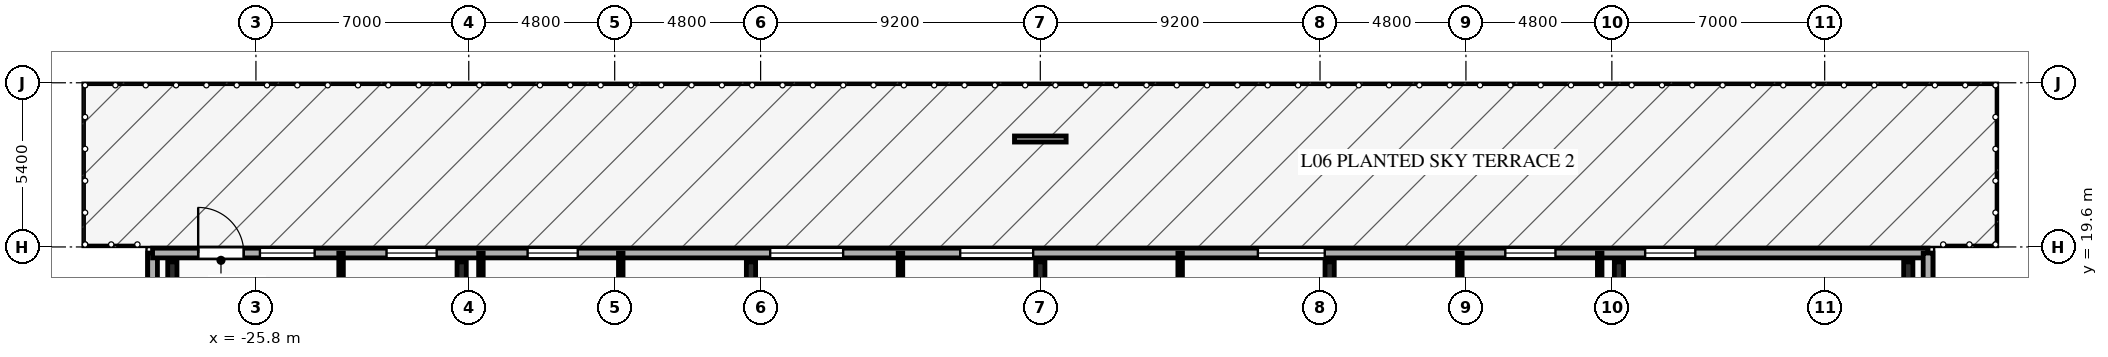
"""IFC4 building model, lengths in metres.
Left out: names, types, materials, properties, quantities, classifications, styles, units other than length and angle.
Written with IfcOpenShell. Run it as: python <this file> out.ifc"""

import sys

from ifc_helpers import new_model, si_unit, direction, frame, frame_2d, origin, origin_2d, place, context, subcontext, project, spatial, rectangle, i_section, extrude, element, fill, save


model = new_model("IFC4")
c1 = context("Model", 3, precision=1e-05, world=origin(), true_north=direction((0.0, 1.0)))
c2 = subcontext(c1, "Body", "Model", "MODEL_VIEW")
j1 = project(units=[si_unit("LENGTHUNIT", "METRE"), si_unit("PLANEANGLEUNIT", "RADIAN")], contexts=[c1])
p1 = place(None, origin())
s1 = spatial("IfcSite", under=j1, at=p1, CompositionType="ELEMENT")
p2 = place(p1, origin())
s2 = spatial("IfcBuilding", under=s1, at=p2, CompositionType="ELEMENT")
p3 = place(p2, frame((0.0, 0.0, 27.0)))
s3 = spatial("IfcBuildingStorey", under=s2, at=p3, CompositionType="ELEMENT", Elevation=27.0)
for number, where, z_axis, x_axis in (
    (1, (28.55, 18.75, 0.0), (0.0, 0.0, 1.0), (1.0, 0.0, 0.0)),
    (2, (19.033, 18.75, 0.0), (0.0, 0.0, 1.0), (1.0, 0.0, 0.0)),
    (3, (9.517, 18.75, 0.0), (0.0, 0.0, 1.0), (1.0, 0.0, 0.0)),
    (4, (0.0, 18.75, 0.0), (0.0, 0.0, 1.0), (1.0, 0.0, 0.0)),
    (5, (-9.517, 18.75, 0.0), (0.0, 0.0, 1.0), (1.0, 0.0, 0.0)),
    (6, (-19.033, 18.75, 0.0), (0.0, 0.0, 1.0), (1.0, 0.0, 0.0)),
    (7, (-28.55, 18.75, 0.0), (0.0, 0.0, 1.0), (1.0, 0.0, 0.0)),
):
    element("IfcColumn", number, at=place(p3, frame(where, z_axis=z_axis, x_axis=x_axis)), inside=s3, PredefinedType="COLUMN", context=c2, shape_type="SweptSolid", body=[
        extrude(i_section(OverallWidth=0.304, OverallDepth=0.716, WebThickness=0.021, FlangeThickness=0.04, FilletRadius=0.027, at=origin_2d()), origin(), (0.0, 0.0, 1.0), 3.35),
    ])
p4 = place(p3, frame((-29.2, 17.6, 0.0), z_axis=(0.0, 0.0, 1.0), x_axis=(0.0, 1.0, 0.0)))
e8 = element("IfcWall", 8, at=p4, inside=s3, PredefinedType="SOLIDWALL", context=c2, shape_type="SweptSolid", body=[
    extrude(rectangle(XDim=1.8, YDim=0.32, at=frame_2d((0.9, 0.0))), origin(), (0.0, 0.0, 1.0), 3.035),
])
p5 = place(p3, frame((-29.2, 19.4, 0.0), z_axis=(0.0, 0.0, 1.0), x_axis=(1.0, 0.0, 0.0)))
e9 = element("IfcWall", 9, at=p5, inside=s3, PredefinedType="SOLIDWALL", context=c2, shape_type="SweptSolid", body=[
    extrude(rectangle(XDim=58.4, YDim=0.32, at=frame_2d((29.2, 0.0))), origin(), (0.0, 0.0, 1.0), 3.035),
])
p6 = place(p5, frame((1.5, 0.0, 0.0)))
e10 = element("IfcOpeningElement", 10, at=p6, cuts=e9, PredefinedType="OPENING", context=c2, shape_type="SweptSolid", body=[
    extrude(rectangle(XDim=1.5, YDim=2.2, at=frame_2d((0.75, 1.1))), frame((0.0, 0.17, 0.0), z_axis=(0.0, -1.0, 0.0), x_axis=(1.0, 0.0, 0.0)), (0.0, 0.0, 1.0), 0.34),
])
p7 = place(p5, frame((3.531, 0.0, 0.85)))
e11 = element("IfcOpeningElement", 11, at=p7, cuts=e9, PredefinedType="OPENING", context=c2, shape_type="SweptSolid", body=[
    extrude(rectangle(XDim=1.8, YDim=1.85, at=frame_2d((0.9, 0.925))), frame((0.0, 0.17, 0.0), z_axis=(0.0, -1.0, 0.0), x_axis=(1.0, 0.0, 0.0)), (0.0, 0.0, 1.0), 0.34),
])
p8 = place(p5, frame((7.695, 0.0, 0.85)))
e12 = element("IfcOpeningElement", 12, at=p8, cuts=e9, PredefinedType="OPENING", context=c2, shape_type="SweptSolid", body=[
    extrude(rectangle(XDim=1.65, YDim=1.85, at=frame_2d((0.825, 0.925))), frame((0.0, 0.17, 0.0), z_axis=(0.0, -1.0, 0.0), x_axis=(1.0, 0.0, 0.0)), (0.0, 0.0, 1.0), 0.34),
])
p9 = place(p5, frame((12.335, 0.0, 0.85)))
e13 = element("IfcOpeningElement", 13, at=p9, cuts=e9, PredefinedType="OPENING", context=c2, shape_type="SweptSolid", body=[
    extrude(rectangle(XDim=1.65, YDim=1.85, at=frame_2d((0.825, 0.925))), frame((0.0, 0.17, 0.0), z_axis=(0.0, -1.0, 0.0), x_axis=(1.0, 0.0, 0.0)), (0.0, 0.0, 1.0), 0.34),
])
p10 = place(p5, frame((20.315, 0.0, 0.85)))
e14 = element("IfcOpeningElement", 14, at=p10, cuts=e9, PredefinedType="OPENING", context=c2, shape_type="SweptSolid", body=[
    extrude(rectangle(XDim=2.4, YDim=1.95, at=frame_2d((1.2, 0.975))), frame((0.0, 0.17, 0.0), z_axis=(0.0, -1.0, 0.0), x_axis=(1.0, 0.0, 0.0)), (0.0, 0.0, 1.0), 0.34),
])
p11 = place(p5, frame((26.565, 0.0, 0.85)))
e15 = element("IfcOpeningElement", 15, at=p11, cuts=e9, PredefinedType="OPENING", context=c2, shape_type="SweptSolid", body=[
    extrude(rectangle(XDim=2.4, YDim=1.95, at=frame_2d((1.2, 0.975))), frame((0.0, 0.17, 0.0), z_axis=(0.0, -1.0, 0.0), x_axis=(1.0, 0.0, 0.0)), (0.0, 0.0, 1.0), 0.34),
])
p12 = place(p5, frame((36.356, 0.0, 0.85)))
e16 = element("IfcOpeningElement", 16, at=p12, cuts=e9, PredefinedType="OPENING", context=c2, shape_type="SweptSolid", body=[
    extrude(rectangle(XDim=2.2, YDim=1.85, at=frame_2d((1.1, 0.925))), frame((0.0, 0.17, 0.0), z_axis=(0.0, -1.0, 0.0), x_axis=(1.0, 0.0, 0.0)), (0.0, 0.0, 1.0), 0.34),
])
p13 = place(p5, frame((44.495, 0.0, 0.85)))
e17 = element("IfcOpeningElement", 17, at=p13, cuts=e9, PredefinedType="OPENING", context=c2, shape_type="SweptSolid", body=[
    extrude(rectangle(XDim=1.65, YDim=1.85, at=frame_2d((0.825, 0.925))), frame((0.0, 0.17, 0.0), z_axis=(0.0, -1.0, 0.0), x_axis=(1.0, 0.0, 0.0)), (0.0, 0.0, 1.0), 0.34),
])
p14 = place(p5, frame((49.095, 0.0, 0.85)))
e18 = element("IfcOpeningElement", 18, at=p14, cuts=e9, PredefinedType="OPENING", context=c2, shape_type="SweptSolid", body=[
    extrude(rectangle(XDim=1.65, YDim=1.85, at=frame_2d((0.825, 0.925))), frame((0.0, 0.17, 0.0), z_axis=(0.0, -1.0, 0.0), x_axis=(1.0, 0.0, 0.0)), (0.0, 0.0, 1.0), 0.34),
])
p15 = place(p3, frame((29.2, 19.4, 0.0), z_axis=(0.0, 0.0, 1.0), x_axis=(0.0, -1.0, 0.0)))
e19 = element("IfcWall", 19, at=p15, inside=s3, PredefinedType="SOLIDWALL", context=c2, shape_type="SweptSolid", body=[
    extrude(rectangle(XDim=1.8, YDim=0.32, at=frame_2d((0.9, 0.0))), origin(), (0.0, 0.0, 1.0), 3.035),
])
p16 = place(p3, frame((-0.85, 23.15, 0.0), z_axis=(0.0, 0.0, 1.0), x_axis=(1.0, 0.0, 0.0)))
e20 = element("IfcWall", 20, at=p16, inside=s3, PredefinedType="USERDEFINED", context=c2, shape_type="SweptSolid", body=[
    extrude(rectangle(XDim=1.7, YDim=0.2, at=frame_2d((0.85, 0.0))), origin(), (0.0, 0.0, 1.0), 0.45),
])
for number, where, z_axis, x_axis in (
    (21, (-23.0, 19.4, 0.0), (0.0, 0.0, 1.0), (0.0, -1.0, 0.0)),
    (22, (-18.4, 19.4, 0.0), (0.0, 0.0, 1.0), (0.0, -1.0, 0.0)),
    (23, (-13.8, 19.4, 0.0), (0.0, 0.0, 1.0), (0.0, -1.0, 0.0)),
    (24, (-4.6, 19.4, 0.0), (0.0, 0.0, 1.0), (0.0, -1.0, 0.0)),
):
    element("IfcWall", number, at=place(p3, frame(where, z_axis=z_axis, x_axis=x_axis)), inside=s3, PredefinedType="PARTITIONING", context=c2, shape_type="SweptSolid", body=[
        extrude(rectangle(XDim=8.75, YDim=0.15, at=frame_2d((4.375, 0.0))), origin(), (0.0, 0.0, 1.0), 3.035),
    ])
p17 = place(p3, frame((4.6, 19.4, 0.0), z_axis=(0.0, 0.0, 1.0), x_axis=(0.0, -1.0, 0.0)))
e25 = element("IfcWall", 25, at=p17, inside=s3, PredefinedType="PARTITIONING", context=c2, shape_type="SweptSolid", body=[
    extrude(rectangle(XDim=6.6, YDim=0.15, at=frame_2d((3.3, 0.0))), origin(), (0.0, 0.0, 1.0), 3.035),
])
for number, where, z_axis, x_axis in (
    (26, (13.8, 19.4, 0.0), (0.0, 0.0, 1.0), (0.0, -1.0, 0.0)),
    (27, (18.4, 19.4, 0.0), (0.0, 0.0, 1.0), (0.0, -1.0, 0.0)),
):
    element("IfcWall", number, at=place(p3, frame(where, z_axis=z_axis, x_axis=x_axis)), inside=s3, PredefinedType="PARTITIONING", context=c2, shape_type="SweptSolid", body=[
        extrude(rectangle(XDim=8.75, YDim=0.15, at=frame_2d((4.375, 0.0))), origin(), (0.0, 0.0, 1.0), 3.035),
    ])
p18 = place(p6, origin())
e28 = element("IfcDoor", 28, at=p18, inside=s3, OperationType="SINGLE_SWING_LEFT", PredefinedType="DOOR", context=c2, shape_type="SweptSolid", body=[
    extrude(rectangle(XDim=1.5, YDim=2.2, at=frame_2d((0.75, 1.1))), frame((0.0, 0.025, 0.0), z_axis=(0.0, -1.0, 0.0), x_axis=(1.0, 0.0, 0.0)), (0.0, 0.0, 1.0), 0.05),
])
fill(e10, e28)
p19 = place(p7, origin())
e29 = element("IfcWindow", 29, at=p19, inside=s3, PartitioningType="SINGLE_PANEL", PredefinedType="WINDOW", context=c2, shape_type="SweptSolid", body=[
    extrude(rectangle(XDim=1.8, YDim=1.85, at=frame_2d((0.9, 0.925))), frame((0.0, 0.03, 0.0), z_axis=(0.0, -1.0, 0.0), x_axis=(1.0, 0.0, 0.0)), (0.0, 0.0, 1.0), 0.06),
])
fill(e11, e29)
p20 = place(p8, origin())
e30 = element("IfcWindow", 30, at=p20, inside=s3, PartitioningType="SINGLE_PANEL", PredefinedType="WINDOW", context=c2, shape_type="SweptSolid", body=[
    extrude(rectangle(XDim=1.65, YDim=1.85, at=frame_2d((0.825, 0.925))), frame((0.0, 0.03, 0.0), z_axis=(0.0, -1.0, 0.0), x_axis=(1.0, 0.0, 0.0)), (0.0, 0.0, 1.0), 0.06),
])
fill(e12, e30)
p21 = place(p9, origin())
e31 = element("IfcWindow", 31, at=p21, inside=s3, PartitioningType="SINGLE_PANEL", PredefinedType="WINDOW", context=c2, shape_type="SweptSolid", body=[
    extrude(rectangle(XDim=1.65, YDim=1.85, at=frame_2d((0.825, 0.925))), frame((0.0, 0.03, 0.0), z_axis=(0.0, -1.0, 0.0), x_axis=(1.0, 0.0, 0.0)), (0.0, 0.0, 1.0), 0.06),
])
fill(e13, e31)
p22 = place(p10, origin())
e32 = element("IfcWindow", 32, at=p22, inside=s3, PartitioningType="SINGLE_PANEL", PredefinedType="WINDOW", context=c2, shape_type="SweptSolid", body=[
    extrude(rectangle(XDim=2.4, YDim=1.95, at=frame_2d((1.2, 0.975))), frame((0.0, 0.03, 0.0), z_axis=(0.0, -1.0, 0.0), x_axis=(1.0, 0.0, 0.0)), (0.0, 0.0, 1.0), 0.06),
])
fill(e14, e32)
p23 = place(p11, origin())
e33 = element("IfcWindow", 33, at=p23, inside=s3, PartitioningType="SINGLE_PANEL", PredefinedType="WINDOW", context=c2, shape_type="SweptSolid", body=[
    extrude(rectangle(XDim=2.4, YDim=1.95, at=frame_2d((1.2, 0.975))), frame((0.0, 0.03, 0.0), z_axis=(0.0, -1.0, 0.0), x_axis=(1.0, 0.0, 0.0)), (0.0, 0.0, 1.0), 0.06),
])
fill(e15, e33)
p24 = place(p12, origin())
e34 = element("IfcWindow", 34, at=p24, inside=s3, PartitioningType="SINGLE_PANEL", PredefinedType="WINDOW", context=c2, shape_type="SweptSolid", body=[
    extrude(rectangle(XDim=2.2, YDim=1.85, at=frame_2d((1.1, 0.925))), frame((0.0, 0.03, 0.0), z_axis=(0.0, -1.0, 0.0), x_axis=(1.0, 0.0, 0.0)), (0.0, 0.0, 1.0), 0.06),
])
fill(e16, e34)
p25 = place(p13, origin())
e35 = element("IfcWindow", 35, at=p25, inside=s3, PartitioningType="SINGLE_PANEL", PredefinedType="WINDOW", context=c2, shape_type="SweptSolid", body=[
    extrude(rectangle(XDim=1.65, YDim=1.85, at=frame_2d((0.825, 0.925))), frame((0.0, 0.03, 0.0), z_axis=(0.0, -1.0, 0.0), x_axis=(1.0, 0.0, 0.0)), (0.0, 0.0, 1.0), 0.06),
])
fill(e17, e35)
p26 = place(p14, origin())
e36 = element("IfcWindow", 36, at=p26, inside=s3, PartitioningType="SINGLE_PANEL", PredefinedType="WINDOW", context=c2, shape_type="SweptSolid", body=[
    extrude(rectangle(XDim=1.65, YDim=1.85, at=frame_2d((0.825, 0.925))), frame((0.0, 0.03, 0.0), z_axis=(0.0, -1.0, 0.0), x_axis=(1.0, 0.0, 0.0)), (0.0, 0.0, 1.0), 0.06),
])
fill(e18, e36)
save(model, sys.argv[1])
